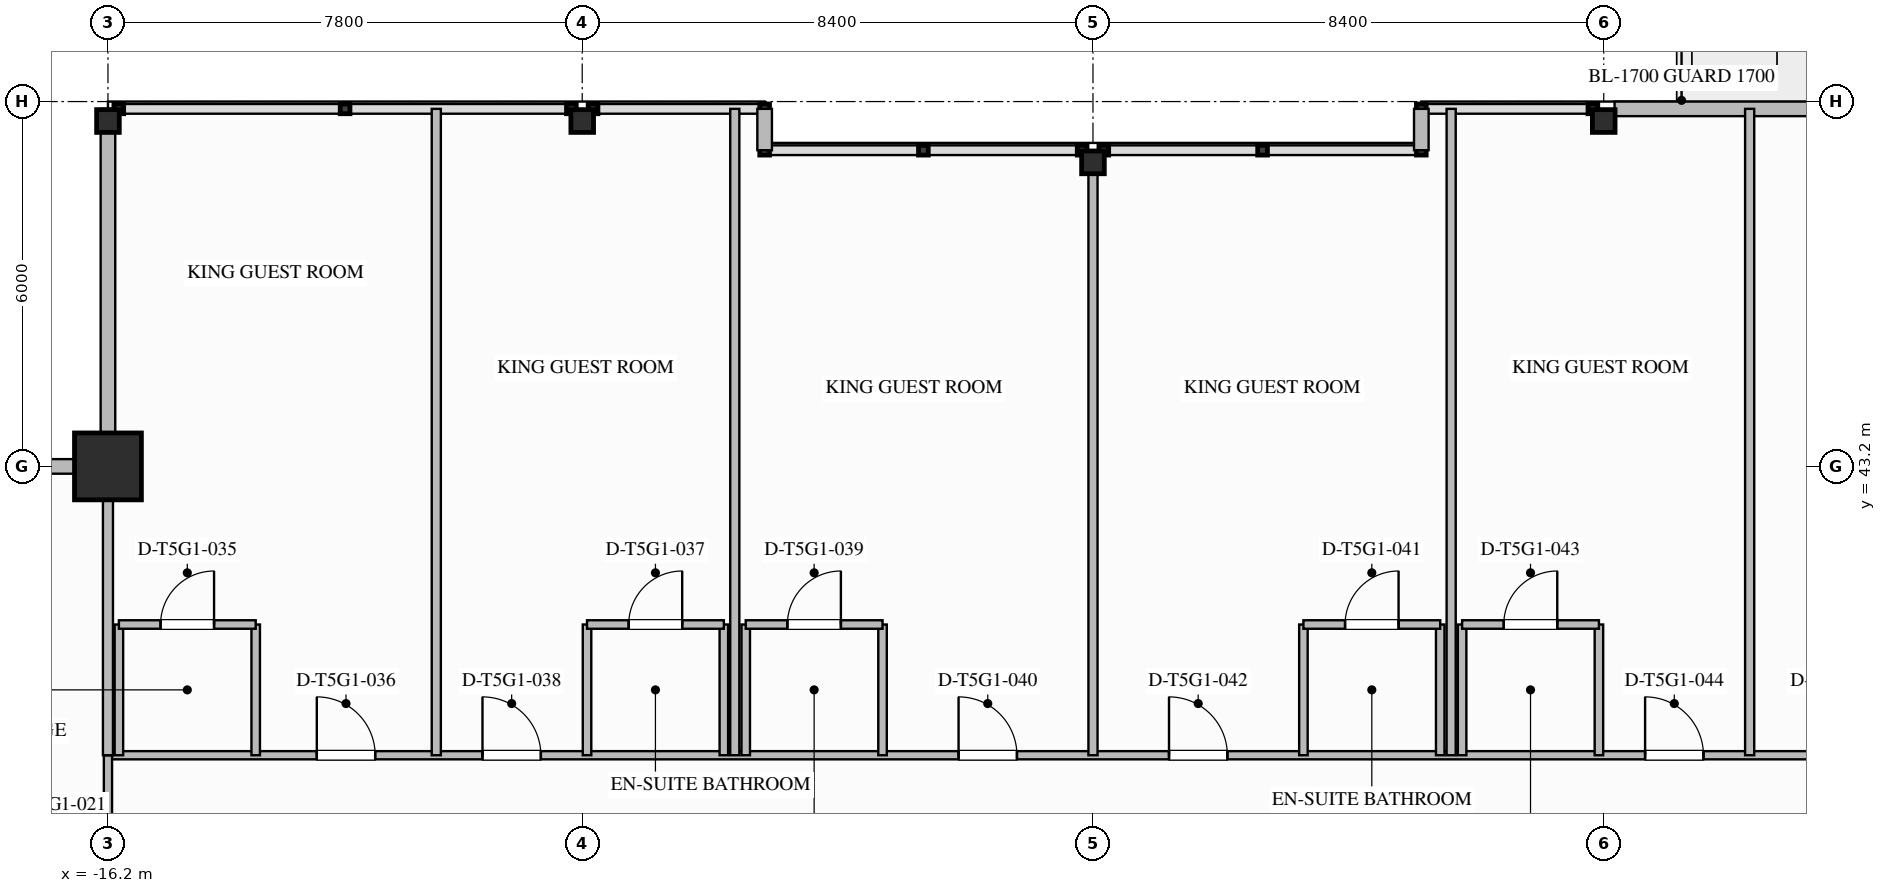
"""IFC4 building model, lengths in metres.
Left out: names, types, materials, properties, quantities, classifications, styles, units other than length and angle.
Written with IfcOpenShell. Run it as: python <this file> out.ifc"""

import sys

from ifc_helpers import new_model, si_unit, direction, frame, frame_2d, origin, origin_2d, place, context, subcontext, project, spatial, rectangle, i_section, extrude, element, fill, save


model = new_model("IFC4")
c1 = context("Model", 3, precision=1e-05, world=origin(), true_north=direction((0.0, 1.0)))
c2 = subcontext(c1, "Body", "Model", "MODEL_VIEW")
j1 = project(units=[si_unit("LENGTHUNIT", "METRE"), si_unit("PLANEANGLEUNIT", "RADIAN")], contexts=[c1])
p1 = place(None, origin())
s1 = spatial("IfcSite", under=j1, at=p1, CompositionType="ELEMENT")
p2 = place(p1, origin())
s2 = spatial("IfcBuilding", under=s1, at=p2, CompositionType="ELEMENT")
p3 = place(p2, frame((0.0, 0.0, 268.65)))
s3 = spatial("IfcBuildingStorey", under=s2, at=p3, CompositionType="ELEMENT", Elevation=268.65)
p4 = place(p3, frame((-16.2, 43.2, 0.0), z_axis=(0.0, 0.0, 1.0), x_axis=(1.0, 0.0, 0.0)))
e1 = element("IfcColumn", 1, at=p4, inside=s3, PredefinedType="COLUMN", context=c2, shape_type="SweptSolid", body=[
    extrude(rectangle(XDim=1.1, YDim=1.1, at=origin_2d()), origin(), (0.0, 0.0, 1.0), 3.65),
])
for number, where, z_axis, x_axis in (
    (2, (-16.2, 48.88, 0.0), (0.0, 0.0, 1.0), (0.0, 1.0, 0.0)),
    (3, (-8.4, 48.88, 0.0), (0.0, 0.0, 1.0), (0.0, 1.0, 0.0)),
    (4, (0.0, 48.2, 0.0), (0.0, 0.0, 1.0), (0.0, 1.0, 0.0)),
    (5, (8.4, 48.88, 0.0), (0.0, 0.0, 1.0), (0.0, 1.0, 0.0)),
):
    element("IfcColumn", number, at=place(p3, frame(where, z_axis=z_axis, x_axis=x_axis)), inside=s3, PredefinedType="COLUMN", context=c2, shape_type="SweptSolid", body=[
        extrude(i_section(OverallWidth=0.374, OverallDepth=0.372, WebThickness=0.016, FlangeThickness=0.026, FilletRadius=0.025, at=origin_2d()), origin(), (0.0, 0.0, 1.0), 3.647),
    ])
p5 = place(p3, frame((8.578, 49.08, 0.0), z_axis=(0.0, 0.0, 1.0), x_axis=(1.0, 0.0, 0.0)))
e6 = element("IfcWall", 6, at=p5, inside=s3, PredefinedType="STANDARD", context=c2, shape_type="SweptSolid", body=[
    extrude(rectangle(XDim=7.444, YDim=0.24, at=frame_2d((3.722, 0.0))), origin(), (0.0, 0.0, 1.0), 2.854),
])
p6 = place(p5, frame((4.622, 0.0, 0.0)))
e7 = element("IfcOpeningElement", 7, at=p6, cuts=e6, PredefinedType="OPENING", context=c2, shape_type="SweptSolid", body=[
    extrude(rectangle(XDim=1.0, YDim=2.2, at=frame_2d((0.5, 1.1))), frame((0.0, 0.13, 0.0), z_axis=(0.0, -1.0, 0.0), x_axis=(1.0, 0.0, 0.0)), (0.0, 0.0, 1.0), 0.26),
])
for number, where, z_axis, x_axis in (
    (8, (-22.08, 43.2, 0.0), (0.0, 0.0, 1.0), (1.0, 0.0, 0.0)),
    (9, (-16.2, 43.2, 0.0), (0.0, 0.0, 1.0), (0.0, 1.0, 0.0)),
):
    element("IfcWall", number, at=place(p3, frame(where, z_axis=z_axis, x_axis=x_axis)), inside=s3, PredefinedType="STANDARD", context=c2, shape_type="SweptSolid", body=[
        extrude(rectangle(XDim=5.88, YDim=0.24, at=frame_2d((2.94, 0.0))), origin(), (0.0, 0.0, 1.0), 2.779),
    ])
for number, where, z_axis, x_axis in (
    (10, (-5.4, 49.08, 0.0), (0.0, 0.0, 1.0), (0.0, -1.0, 0.0)),
    (11, (5.4, 48.4, 0.0), (0.0, 0.0, 1.0), (0.0, 1.0, 0.0)),
):
    element("IfcWall", number, at=place(p3, frame(where, z_axis=z_axis, x_axis=x_axis)), inside=s3, PredefinedType="STANDARD", context=c2, shape_type="SweptSolid", body=[
        extrude(rectangle(XDim=0.68, YDim=0.24, at=frame_2d((0.34, 0.0))), origin(), (0.0, 0.0, 1.0), 3.39),
    ])
p7 = place(p3, frame((-16.2, 38.45, 0.0), z_axis=(0.0, 0.0, 1.0), x_axis=(1.0, 0.0, 0.0)))
e12 = element("IfcWall", 12, at=p7, inside=s3, PredefinedType="PARTITIONING", context=c2, shape_type="SweptSolid", body=[
    extrude(rectangle(XDim=38.28, YDim=0.135, at=frame_2d((19.14, 0.0))), origin(), (0.0, 0.0, 1.0), 3.39),
])
p8 = place(p7, frame((33.355, 0.0, 0.0)))
e13 = element("IfcOpeningElement", 13, at=p8, cuts=e12, PredefinedType="OPENING", context=c2, shape_type="SweptSolid", body=[
    extrude(rectangle(XDim=1.26, YDim=2.2, at=frame_2d((0.63, 1.1))), frame((0.0, 0.077, 0.0), z_axis=(0.0, -1.0, 0.0), x_axis=(1.0, 0.0, 0.0)), (0.0, 0.0, 1.0), 0.155),
])
p9 = place(p7, frame((3.435, 0.0, 0.0)))
e14 = element("IfcOpeningElement", 14, at=p9, cuts=e12, PredefinedType="OPENING", context=c2, shape_type="SweptSolid", body=[
    extrude(rectangle(XDim=0.96, YDim=2.15, at=frame_2d((0.48, 1.075))), frame((0.0, 0.077, 0.0), z_axis=(0.0, -1.0, 0.0), x_axis=(1.0, 0.0, 0.0)), (0.0, 0.0, 1.0), 0.155),
])
p10 = place(p7, frame((6.16, 0.0, 0.0)))
e15 = element("IfcOpeningElement", 15, at=p10, cuts=e12, PredefinedType="OPENING", context=c2, shape_type="SweptSolid", body=[
    extrude(rectangle(XDim=0.96, YDim=2.15, at=frame_2d((0.48, 1.075))), frame((0.0, 0.077, 0.0), z_axis=(0.0, -1.0, 0.0), x_axis=(1.0, 0.0, 0.0)), (0.0, 0.0, 1.0), 0.155),
])
p11 = place(p7, frame((13.99, 0.0, 0.0)))
e16 = element("IfcOpeningElement", 16, at=p11, cuts=e12, PredefinedType="OPENING", context=c2, shape_type="SweptSolid", body=[
    extrude(rectangle(XDim=0.96, YDim=2.15, at=frame_2d((0.48, 1.075))), frame((0.0, 0.077, 0.0), z_axis=(0.0, -1.0, 0.0), x_axis=(1.0, 0.0, 0.0)), (0.0, 0.0, 1.0), 0.155),
])
p12 = place(p7, frame((17.45, 0.0, 0.0)))
e17 = element("IfcOpeningElement", 17, at=p12, cuts=e12, PredefinedType="OPENING", context=c2, shape_type="SweptSolid", body=[
    extrude(rectangle(XDim=0.96, YDim=2.15, at=frame_2d((0.48, 1.075))), frame((0.0, 0.077, 0.0), z_axis=(0.0, -1.0, 0.0), x_axis=(1.0, 0.0, 0.0)), (0.0, 0.0, 1.0), 0.155),
])
p13 = place(p7, frame((25.281, 0.0, 0.0)))
e18 = element("IfcOpeningElement", 18, at=p13, cuts=e12, PredefinedType="OPENING", context=c2, shape_type="SweptSolid", body=[
    extrude(rectangle(XDim=0.96, YDim=2.15, at=frame_2d((0.48, 1.075))), frame((0.0, 0.077, 0.0), z_axis=(0.0, -1.0, 0.0), x_axis=(1.0, 0.0, 0.0)), (0.0, 0.0, 1.0), 0.155),
])
p14 = place(p7, frame((28.005, 0.0, 0.0)))
e19 = element("IfcOpeningElement", 19, at=p14, cuts=e12, PredefinedType="OPENING", context=c2, shape_type="SweptSolid", body=[
    extrude(rectangle(XDim=0.96, YDim=2.15, at=frame_2d((0.48, 1.075))), frame((0.0, 0.077, 0.0), z_axis=(0.0, -1.0, 0.0), x_axis=(1.0, 0.0, 0.0)), (0.0, 0.0, 1.0), 0.155),
])
p15 = place(p3, frame((-16.2, 35.6, 0.0), z_axis=(0.0, 0.0, 1.0), x_axis=(0.0, 1.0, 0.0)))
e20 = element("IfcWall", 20, at=p15, inside=s3, PredefinedType="PARTITIONING", context=c2, shape_type="SweptSolid", body=[
    extrude(rectangle(XDim=2.85, YDim=0.135, at=frame_2d((1.425, 0.0))), origin(), (0.0, 0.0, 1.0), 2.764),
])
p16 = place(p15, frame((0.52, 0.0, 0.0)))
e21 = element("IfcOpeningElement", 21, at=p16, cuts=e20, PredefinedType="OPENING", context=c2, shape_type="SweptSolid", body=[
    extrude(rectangle(XDim=1.02, YDim=2.15, at=frame_2d((0.51, 1.075))), frame((0.0, 0.077, 0.0), z_axis=(0.0, -1.0, 0.0), x_axis=(1.0, 0.0, 0.0)), (0.0, 0.0, 1.0), 0.155),
])
p17 = place(p3, frame((-16.2, 38.45, 0.0), z_axis=(0.0, 0.0, 1.0), x_axis=(0.0, 1.0, 0.0)))
e22 = element("IfcWall", 22, at=p17, inside=s3, PredefinedType="PARTITIONING", context=c2, shape_type="SweptSolid", body=[
    extrude(rectangle(XDim=4.63, YDim=0.165, at=frame_2d((2.315, 0.0))), origin(), (0.0, 0.0, 1.0), 2.764),
])
p18 = place(p3, frame((-16.02, 38.45, 0.0), z_axis=(0.0, 0.0, 1.0), x_axis=(0.0, 1.0, 0.0)))
e23 = element("IfcWall", 23, at=p18, inside=s3, PredefinedType="PLUMBINGWALL", context=c2, shape_type="SweptSolid", body=[
    extrude(rectangle(XDim=2.15, YDim=0.14, at=frame_2d((1.075, 0.0))), origin(), (0.0, 0.0, 1.0), 2.764),
])
p19 = place(p3, frame((-13.77, 38.45, 0.0), z_axis=(0.0, 0.0, 1.0), x_axis=(0.0, 1.0, 0.0)))
e24 = element("IfcWall", 24, at=p19, inside=s3, PredefinedType="PLUMBINGWALL", context=c2, shape_type="SweptSolid", body=[
    extrude(rectangle(XDim=2.15, YDim=0.14, at=frame_2d((1.075, 0.0))), origin(), (0.0, 0.0, 1.0), 3.39),
])
p20 = place(p3, frame((-16.02, 40.6, 0.0), z_axis=(0.0, 0.0, 1.0), x_axis=(1.0, 0.0, 0.0)))
e25 = element("IfcWall", 25, at=p20, inside=s3, PredefinedType="PLUMBINGWALL", context=c2, shape_type="SweptSolid", body=[
    extrude(rectangle(XDim=2.25, YDim=0.14, at=frame_2d((1.125, 0.0))), origin(), (0.0, 0.0, 1.0), 3.39),
])
p21 = place(p20, frame((0.685, 0.0, 0.0)))
e26 = element("IfcOpeningElement", 26, at=p21, cuts=e25, PredefinedType="OPENING", context=c2, shape_type="SweptSolid", body=[
    extrude(rectangle(XDim=0.88, YDim=2.1, at=frame_2d((0.44, 1.05))), frame((0.0, 0.08, 0.0), z_axis=(0.0, -1.0, 0.0), x_axis=(1.0, 0.0, 0.0)), (0.0, 0.0, 1.0), 0.16),
])
p22 = place(p3, frame((-10.8, 38.45, 0.0), z_axis=(0.0, 0.0, 1.0), x_axis=(0.0, 1.0, 0.0)))
e27 = element("IfcWall", 27, at=p22, inside=s3, PredefinedType="PARTITIONING", context=c2, shape_type="SweptSolid", body=[
    extrude(rectangle(XDim=10.63, YDim=0.15, at=frame_2d((5.315, 0.0))), origin(), (0.0, 0.0, 1.0), 3.39),
])
p23 = place(p3, frame((-8.321, 38.45, 0.0), z_axis=(0.0, 0.0, 1.0), x_axis=(0.0, 1.0, 0.0)))
e28 = element("IfcWall", 28, at=p23, inside=s3, PredefinedType="PLUMBINGWALL", context=c2, shape_type="SweptSolid", body=[
    extrude(rectangle(XDim=2.15, YDim=0.14, at=frame_2d((1.075, 0.0))), origin(), (0.0, 0.0, 1.0), 2.768),
])
p24 = place(p3, frame((-6.071, 38.45, 0.0), z_axis=(0.0, 0.0, 1.0), x_axis=(0.0, 1.0, 0.0)))
e29 = element("IfcWall", 29, at=p24, inside=s3, PredefinedType="PLUMBINGWALL", context=c2, shape_type="SweptSolid", body=[
    extrude(rectangle(XDim=2.15, YDim=0.14, at=frame_2d((1.075, 0.0))), origin(), (0.0, 0.0, 1.0), 3.39),
])
p25 = place(p3, frame((-8.321, 40.6, 0.0), z_axis=(0.0, 0.0, 1.0), x_axis=(1.0, 0.0, 0.0)))
e30 = element("IfcWall", 30, at=p25, inside=s3, PredefinedType="PLUMBINGWALL", context=c2, shape_type="SweptSolid", body=[
    extrude(rectangle(XDim=2.25, YDim=0.14, at=frame_2d((1.125, 0.0))), origin(), (0.0, 0.0, 1.0), 3.39),
])
p26 = place(p25, frame((0.685, 0.0, 0.0)))
e31 = element("IfcOpeningElement", 31, at=p26, cuts=e30, PredefinedType="OPENING", context=c2, shape_type="SweptSolid", body=[
    extrude(rectangle(XDim=0.88, YDim=2.1, at=frame_2d((0.44, 1.05))), frame((0.0, 0.08, 0.0), z_axis=(0.0, -1.0, 0.0), x_axis=(1.0, 0.0, 0.0)), (0.0, 0.0, 1.0), 0.16),
])
p27 = place(p3, frame((-5.891, 38.45, 0.0), z_axis=(0.0, 0.0, 1.0), x_axis=(0.0, 1.0, 0.0)))
e32 = element("IfcWall", 32, at=p27, inside=s3, PredefinedType="PARTITIONING", context=c2, shape_type="SweptSolid", body=[
    extrude(rectangle(XDim=10.63, YDim=0.15, at=frame_2d((5.315, 0.0))), origin(), (0.0, 0.0, 1.0), 3.39),
])
for number, where, z_axis, x_axis in (
    (33, (-5.711, 38.45, 0.0), (0.0, 0.0, 1.0), (0.0, 1.0, 0.0)),
    (34, (-3.461, 38.45, 0.0), (0.0, 0.0, 1.0), (0.0, 1.0, 0.0)),
):
    element("IfcWall", number, at=place(p3, frame(where, z_axis=z_axis, x_axis=x_axis)), inside=s3, PredefinedType="PLUMBINGWALL", context=c2, shape_type="SweptSolid", body=[
        extrude(rectangle(XDim=2.15, YDim=0.14, at=frame_2d((1.075, 0.0))), origin(), (0.0, 0.0, 1.0), 3.39),
    ])
p28 = place(p3, frame((-5.711, 40.6, 0.0), z_axis=(0.0, 0.0, 1.0), x_axis=(1.0, 0.0, 0.0)))
e35 = element("IfcWall", 35, at=p28, inside=s3, PredefinedType="PLUMBINGWALL", context=c2, shape_type="SweptSolid", body=[
    extrude(rectangle(XDim=2.25, YDim=0.14, at=frame_2d((1.125, 0.0))), origin(), (0.0, 0.0, 1.0), 3.39),
])
p29 = place(p28, frame((0.685, 0.0, 0.0)))
e36 = element("IfcOpeningElement", 36, at=p29, cuts=e35, PredefinedType="OPENING", context=c2, shape_type="SweptSolid", body=[
    extrude(rectangle(XDim=0.88, YDim=2.1, at=frame_2d((0.44, 1.05))), frame((0.0, 0.08, 0.0), z_axis=(0.0, -1.0, 0.0), x_axis=(1.0, 0.0, 0.0)), (0.0, 0.0, 1.0), 0.16),
])
p30 = place(p3, frame((0.0, 38.45, 0.0), z_axis=(0.0, 0.0, 1.0), x_axis=(0.0, 1.0, 0.0)))
e37 = element("IfcWall", 37, at=p30, inside=s3, PredefinedType="PARTITIONING", context=c2, shape_type="SweptSolid", body=[
    extrude(rectangle(XDim=9.95, YDim=0.15, at=frame_2d((4.975, 0.0))), origin(), (0.0, 0.0, 1.0), 2.768),
])
for number, where, z_axis, x_axis in (
    (38, (3.461, 38.45, 0.0), (0.0, 0.0, 1.0), (0.0, 1.0, 0.0)),
    (39, (5.711, 38.45, 0.0), (0.0, 0.0, 1.0), (0.0, 1.0, 0.0)),
):
    element("IfcWall", number, at=place(p3, frame(where, z_axis=z_axis, x_axis=x_axis)), inside=s3, PredefinedType="PLUMBINGWALL", context=c2, shape_type="SweptSolid", body=[
        extrude(rectangle(XDim=2.15, YDim=0.14, at=frame_2d((1.075, 0.0))), origin(), (0.0, 0.0, 1.0), 3.39),
    ])
p31 = place(p3, frame((3.461, 40.6, 0.0), z_axis=(0.0, 0.0, 1.0), x_axis=(1.0, 0.0, 0.0)))
e40 = element("IfcWall", 40, at=p31, inside=s3, PredefinedType="PLUMBINGWALL", context=c2, shape_type="SweptSolid", body=[
    extrude(rectangle(XDim=2.25, YDim=0.14, at=frame_2d((1.125, 0.0))), origin(), (0.0, 0.0, 1.0), 3.39),
])
p32 = place(p31, frame((0.685, 0.0, 0.0)))
e41 = element("IfcOpeningElement", 41, at=p32, cuts=e40, PredefinedType="OPENING", context=c2, shape_type="SweptSolid", body=[
    extrude(rectangle(XDim=0.88, YDim=2.1, at=frame_2d((0.44, 1.05))), frame((0.0, 0.08, 0.0), z_axis=(0.0, -1.0, 0.0), x_axis=(1.0, 0.0, 0.0)), (0.0, 0.0, 1.0), 0.16),
])
p33 = place(p3, frame((5.891, 38.45, 0.0), z_axis=(0.0, 0.0, 1.0), x_axis=(0.0, 1.0, 0.0)))
e42 = element("IfcWall", 42, at=p33, inside=s3, PredefinedType="PARTITIONING", context=c2, shape_type="SweptSolid", body=[
    extrude(rectangle(XDim=10.63, YDim=0.15, at=frame_2d((5.315, 0.0))), origin(), (0.0, 0.0, 1.0), 3.39),
])
p34 = place(p3, frame((6.071, 38.45, 0.0), z_axis=(0.0, 0.0, 1.0), x_axis=(0.0, 1.0, 0.0)))
e43 = element("IfcWall", 43, at=p34, inside=s3, PredefinedType="PLUMBINGWALL", context=c2, shape_type="SweptSolid", body=[
    extrude(rectangle(XDim=2.15, YDim=0.14, at=frame_2d((1.075, 0.0))), origin(), (0.0, 0.0, 1.0), 3.39),
])
p35 = place(p3, frame((8.321, 38.45, 0.0), z_axis=(0.0, 0.0, 1.0), x_axis=(0.0, 1.0, 0.0)))
e44 = element("IfcWall", 44, at=p35, inside=s3, PredefinedType="PLUMBINGWALL", context=c2, shape_type="SweptSolid", body=[
    extrude(rectangle(XDim=2.15, YDim=0.14, at=frame_2d((1.075, 0.0))), origin(), (0.0, 0.0, 1.0), 2.768),
])
p36 = place(p3, frame((6.071, 40.6, 0.0), z_axis=(0.0, 0.0, 1.0), x_axis=(1.0, 0.0, 0.0)))
e45 = element("IfcWall", 45, at=p36, inside=s3, PredefinedType="PLUMBINGWALL", context=c2, shape_type="SweptSolid", body=[
    extrude(rectangle(XDim=2.25, YDim=0.14, at=frame_2d((1.125, 0.0))), origin(), (0.0, 0.0, 1.0), 3.39),
])
p37 = place(p36, frame((0.685, 0.0, 0.0)))
e46 = element("IfcOpeningElement", 46, at=p37, cuts=e45, PredefinedType="OPENING", context=c2, shape_type="SweptSolid", body=[
    extrude(rectangle(XDim=0.88, YDim=2.1, at=frame_2d((0.44, 1.05))), frame((0.0, 0.08, 0.0), z_axis=(0.0, -1.0, 0.0), x_axis=(1.0, 0.0, 0.0)), (0.0, 0.0, 1.0), 0.16),
])
p38 = place(p3, frame((10.8, 38.45, 0.0), z_axis=(0.0, 0.0, 1.0), x_axis=(0.0, 1.0, 0.0)))
e47 = element("IfcWall", 47, at=p38, inside=s3, PredefinedType="PARTITIONING", context=c2, shape_type="SweptSolid", body=[
    extrude(rectangle(XDim=10.63, YDim=0.15, at=frame_2d((5.315, 0.0))), origin(), (0.0, 0.0, 1.0), 3.39),
])
p39 = place(p21, origin())
e48 = element("IfcDoor", 48, at=p39, inside=s3, OperationType="SINGLE_SWING_RIGHT", PredefinedType="DOOR", context=c2, shape_type="SweptSolid", body=[
    extrude(rectangle(XDim=0.88, YDim=2.1, at=frame_2d((0.44, 1.05))), frame((0.0, 0.025, 0.0), z_axis=(0.0, -1.0, 0.0), x_axis=(1.0, 0.0, 0.0)), (0.0, 0.0, 1.0), 0.05),
])
fill(e26, e48)
p40 = place(p9, origin())
e49 = element("IfcDoor", 49, at=p40, inside=s3, OperationType="SINGLE_SWING_LEFT", PredefinedType="DOOR", context=c2, shape_type="SweptSolid", body=[
    extrude(rectangle(XDim=0.96, YDim=2.15, at=frame_2d((0.48, 1.075))), frame((0.0, 0.025, 0.0), z_axis=(0.0, -1.0, 0.0), x_axis=(1.0, 0.0, 0.0)), (0.0, 0.0, 1.0), 0.05),
])
fill(e14, e49)
p41 = place(p26, origin())
e50 = element("IfcDoor", 50, at=p41, inside=s3, OperationType="SINGLE_SWING_RIGHT", PredefinedType="DOOR", context=c2, shape_type="SweptSolid", body=[
    extrude(rectangle(XDim=0.88, YDim=2.1, at=frame_2d((0.44, 1.05))), frame((0.0, 0.025, 0.0), z_axis=(0.0, -1.0, 0.0), x_axis=(1.0, 0.0, 0.0)), (0.0, 0.0, 1.0), 0.05),
])
fill(e31, e50)
p42 = place(p10, origin())
e51 = element("IfcDoor", 51, at=p42, inside=s3, OperationType="SINGLE_SWING_LEFT", PredefinedType="DOOR", context=c2, shape_type="SweptSolid", body=[
    extrude(rectangle(XDim=0.96, YDim=2.15, at=frame_2d((0.48, 1.075))), frame((0.0, 0.025, 0.0), z_axis=(0.0, -1.0, 0.0), x_axis=(1.0, 0.0, 0.0)), (0.0, 0.0, 1.0), 0.05),
])
fill(e15, e51)
p43 = place(p29, origin())
e52 = element("IfcDoor", 52, at=p43, inside=s3, OperationType="SINGLE_SWING_RIGHT", PredefinedType="DOOR", context=c2, shape_type="SweptSolid", body=[
    extrude(rectangle(XDim=0.88, YDim=2.1, at=frame_2d((0.44, 1.05))), frame((0.0, 0.025, 0.0), z_axis=(0.0, -1.0, 0.0), x_axis=(1.0, 0.0, 0.0)), (0.0, 0.0, 1.0), 0.05),
])
fill(e36, e52)
p44 = place(p11, origin())
e53 = element("IfcDoor", 53, at=p44, inside=s3, OperationType="SINGLE_SWING_LEFT", PredefinedType="DOOR", context=c2, shape_type="SweptSolid", body=[
    extrude(rectangle(XDim=0.96, YDim=2.15, at=frame_2d((0.48, 1.075))), frame((0.0, 0.025, 0.0), z_axis=(0.0, -1.0, 0.0), x_axis=(1.0, 0.0, 0.0)), (0.0, 0.0, 1.0), 0.05),
])
fill(e16, e53)
p45 = place(p32, origin())
e54 = element("IfcDoor", 54, at=p45, inside=s3, OperationType="SINGLE_SWING_RIGHT", PredefinedType="DOOR", context=c2, shape_type="SweptSolid", body=[
    extrude(rectangle(XDim=0.88, YDim=2.1, at=frame_2d((0.44, 1.05))), frame((0.0, 0.025, 0.0), z_axis=(0.0, -1.0, 0.0), x_axis=(1.0, 0.0, 0.0)), (0.0, 0.0, 1.0), 0.05),
])
fill(e41, e54)
p46 = place(p12, origin())
e55 = element("IfcDoor", 55, at=p46, inside=s3, OperationType="SINGLE_SWING_LEFT", PredefinedType="DOOR", context=c2, shape_type="SweptSolid", body=[
    extrude(rectangle(XDim=0.96, YDim=2.15, at=frame_2d((0.48, 1.075))), frame((0.0, 0.025, 0.0), z_axis=(0.0, -1.0, 0.0), x_axis=(1.0, 0.0, 0.0)), (0.0, 0.0, 1.0), 0.05),
])
fill(e17, e55)
p47 = place(p37, origin())
e56 = element("IfcDoor", 56, at=p47, inside=s3, OperationType="SINGLE_SWING_RIGHT", PredefinedType="DOOR", context=c2, shape_type="SweptSolid", body=[
    extrude(rectangle(XDim=0.88, YDim=2.1, at=frame_2d((0.44, 1.05))), frame((0.0, 0.025, 0.0), z_axis=(0.0, -1.0, 0.0), x_axis=(1.0, 0.0, 0.0)), (0.0, 0.0, 1.0), 0.05),
])
fill(e46, e56)
p48 = place(p13, origin())
e57 = element("IfcDoor", 57, at=p48, inside=s3, OperationType="SINGLE_SWING_LEFT", PredefinedType="DOOR", context=c2, shape_type="SweptSolid", body=[
    extrude(rectangle(XDim=0.96, YDim=2.15, at=frame_2d((0.48, 1.075))), frame((0.0, 0.025, 0.0), z_axis=(0.0, -1.0, 0.0), x_axis=(1.0, 0.0, 0.0)), (0.0, 0.0, 1.0), 0.05),
])
fill(e18, e57)
save(model, sys.argv[1])
